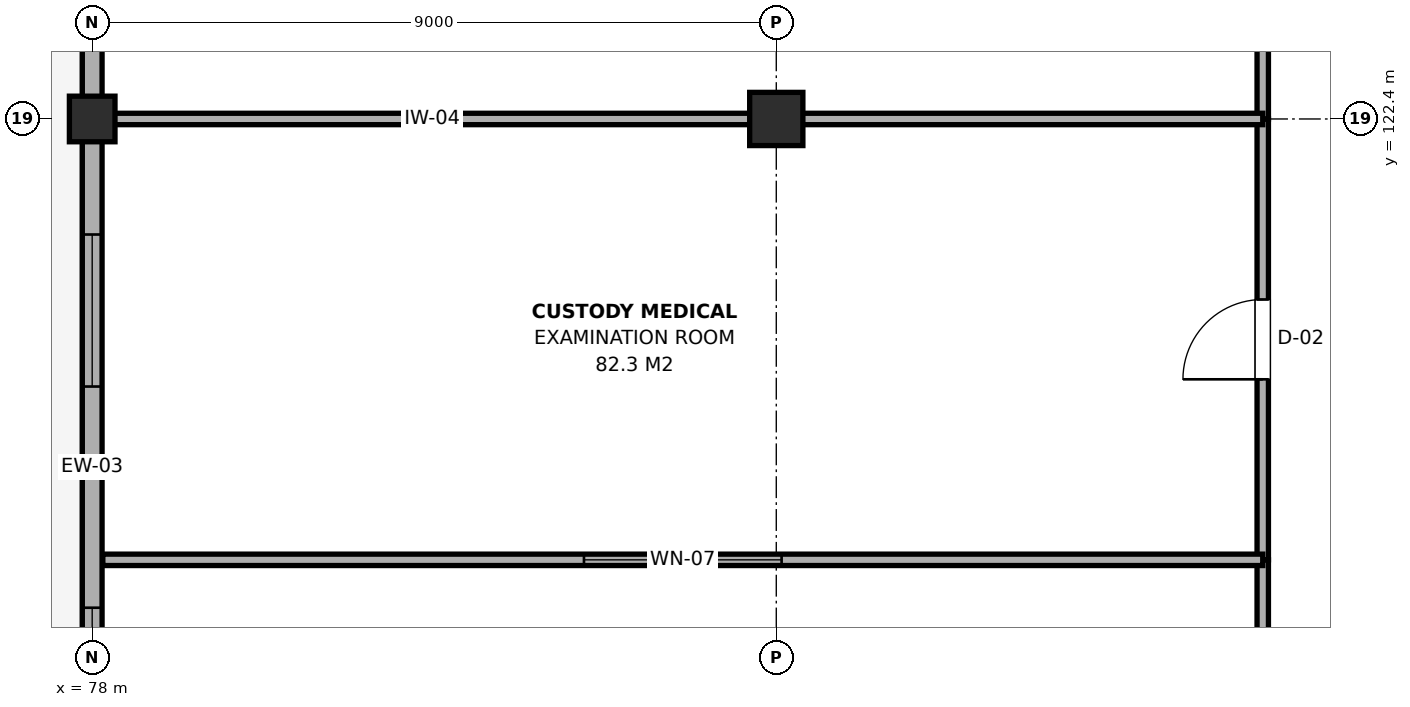
"""IFC4 building model, lengths in metres.
Left out: names, types, materials, properties, quantities, classifications, styles, units other than length and angle.
Written with IfcOpenShell. Run it as: python <this file> out.ifc"""

import sys

from ifc_helpers import new_model, si_unit, direction, frame, frame_2d, origin, origin_2d, place, context, subcontext, project, spatial, rectangle, extrude, element, fill, save


model = new_model("IFC4")
c1 = context("Model", 3, precision=1e-05, world=origin(), true_north=direction((0.0, 1.0)))
c2 = subcontext(c1, "Body", "Model", "MODEL_VIEW")
j1 = project(units=[si_unit("LENGTHUNIT", "METRE"), si_unit("PLANEANGLEUNIT", "RADIAN")], contexts=[c1])
p1 = place(None, origin())
s1 = spatial("IfcSite", under=j1, at=p1, CompositionType="ELEMENT")
p2 = place(p1, origin())
s2 = spatial("IfcBuilding", under=s1, at=p2, CompositionType="ELEMENT")
p3 = place(p2, frame((0.0, 0.0, 4.8)))
s3 = spatial("IfcBuildingStorey", under=s2, at=p3, CompositionType="ELEMENT", Elevation=4.8)
p4 = place(p3, frame((78.0, 122.4, 0.0), z_axis=(0.0, 0.0, 1.0), x_axis=(1.0, 0.0, 0.0)))
e1 = element("IfcColumn", 1, at=p4, inside=s3, PredefinedType="COLUMN", context=c2, shape_type="SweptSolid", body=[
    extrude(rectangle(XDim=0.6, YDim=0.6, at=origin_2d()), origin(), (0.0, 0.0, 1.0), 4.2),
])
p5 = place(p3, frame((87.0, 122.4, 0.0), z_axis=(0.0, 0.0, 1.0), x_axis=(1.0, 0.0, 0.0)))
e2 = element("IfcColumn", 2, at=p5, inside=s3, PredefinedType="COLUMN", context=c2, shape_type="SweptSolid", body=[
    extrude(rectangle(XDim=0.7, YDim=0.7, at=origin_2d()), origin(), (0.0, 0.0, 1.0), 4.2),
])
p6 = place(p3, frame((78.0, 113.4, 0.0), z_axis=(0.0, 0.0, 1.0), x_axis=(0.0, 1.0, 0.0)))
e3 = element("IfcWall", 3, at=p6, inside=s3, PredefinedType="SOLIDWALL", context=c2, shape_type="SweptSolid", body=[
    extrude(rectangle(XDim=9.0, YDim=0.26, at=frame_2d((4.5, 0.0))), origin(), (0.0, 0.0, 1.0), 3.485),
])
p7 = place(p6, frame((0.57, 0.0, 1.05)))
e4 = element("IfcOpeningElement", 4, at=p7, cuts=e3, PredefinedType="OPENING", context=c2, shape_type="SweptSolid", body=[
    extrude(rectangle(XDim=2.0, YDim=1.8, at=frame_2d((1.0, 0.9))), frame((0.0, 0.145, 0.0), z_axis=(0.0, -1.0, 0.0), x_axis=(1.0, 0.0, 0.0)), (0.0, 0.0, 1.0), 0.29),
])
p8 = place(p6, frame((5.48, 0.0, 1.05)))
e5 = element("IfcOpeningElement", 5, at=p8, cuts=e3, PredefinedType="OPENING", context=c2, shape_type="SweptSolid", body=[
    extrude(rectangle(XDim=2.0, YDim=1.8, at=frame_2d((1.0, 0.9))), frame((0.0, 0.145, 0.0), z_axis=(0.0, -1.0, 0.0), x_axis=(1.0, 0.0, 0.0)), (0.0, 0.0, 1.0), 0.29),
])
p9 = place(p3, frame((78.0, 122.4, 0.0), z_axis=(0.0, 0.0, 1.0), x_axis=(0.0, 1.0, 0.0)))
e6 = element("IfcWall", 6, at=p9, inside=s3, PredefinedType="SOLIDWALL", context=c2, shape_type="SweptSolid", body=[
    extrude(rectangle(XDim=8.4, YDim=0.26, at=frame_2d((4.2, 0.0))), origin(), (0.0, 0.0, 1.0), 3.535),
])
p10 = place(p9, frame((1.352, 0.0, 1.05)))
e7 = element("IfcOpeningElement", 7, at=p10, cuts=e6, PredefinedType="OPENING", context=c2, shape_type="SweptSolid", body=[
    extrude(rectangle(XDim=2.0, YDim=1.8, at=frame_2d((1.0, 0.9))), frame((0.0, 0.145, 0.0), z_axis=(0.0, -1.0, 0.0), x_axis=(1.0, 0.0, 0.0)), (0.0, 0.0, 1.0), 0.29),
])
p11 = place(p9, frame((5.048, 0.0, 1.05)))
e8 = element("IfcOpeningElement", 8, at=p11, cuts=e6, PredefinedType="OPENING", context=c2, shape_type="SweptSolid", body=[
    extrude(rectangle(XDim=2.0, YDim=1.8, at=frame_2d((1.0, 0.9))), frame((0.0, 0.145, 0.0), z_axis=(0.0, -1.0, 0.0), x_axis=(1.0, 0.0, 0.0)), (0.0, 0.0, 1.0), 0.29),
])
p12 = place(p3, frame((93.4, 110.6, 0.0), z_axis=(0.0, 0.0, 1.0), x_axis=(0.0, 1.0, 0.0)))
e9 = element("IfcWall", 9, at=p12, inside=s3, PredefinedType="PARTITIONING", context=c2, shape_type="SweptSolid", body=[
    extrude(rectangle(XDim=6.0, YDim=0.15, at=frame_2d((3.0, 0.0))), origin(), (0.0, 0.0, 1.0), 3.625),
])
p13 = place(p12, frame((2.525, 0.0, 0.0)))
e10 = element("IfcOpeningElement", 10, at=p13, cuts=e9, PredefinedType="OPENING", context=c2, shape_type="SweptSolid", body=[
    extrude(rectangle(XDim=0.95, YDim=2.15, at=frame_2d((0.475, 1.075))), frame((0.0, 0.09, 0.0), z_axis=(0.0, -1.0, 0.0), x_axis=(1.0, 0.0, 0.0)), (0.0, 0.0, 1.0), 0.18),
])
p14 = place(p3, frame((93.4, 116.6, 0.0), z_axis=(0.0, 0.0, 1.0), x_axis=(0.0, 1.0, 0.0)))
e11 = element("IfcWall", 11, at=p14, inside=s3, PredefinedType="PARTITIONING", context=c2, shape_type="SweptSolid", body=[
    extrude(rectangle(XDim=5.8, YDim=0.15, at=frame_2d((2.9, 0.0))), origin(), (0.0, 0.0, 1.0), 3.385),
])
p15 = place(p14, frame((2.375, 0.0, 0.0)))
e12 = element("IfcOpeningElement", 12, at=p15, cuts=e11, PredefinedType="OPENING", context=c2, shape_type="SweptSolid", body=[
    extrude(rectangle(XDim=1.05, YDim=2.15, at=frame_2d((0.525, 1.075))), frame((0.0, 0.09, 0.0), z_axis=(0.0, -1.0, 0.0), x_axis=(1.0, 0.0, 0.0)), (0.0, 0.0, 1.0), 0.18),
])
p16 = place(p3, frame((78.14, 116.6, 0.0), z_axis=(0.0, 0.0, 1.0), x_axis=(1.0, 0.0, 0.0)))
e13 = element("IfcWall", 13, at=p16, inside=s3, PredefinedType="PARTITIONING", context=c2, shape_type="SweptSolid", body=[
    extrude(rectangle(XDim=15.26, YDim=0.15, at=frame_2d((7.63, 0.0))), origin(), (0.0, 0.0, 1.0), 3.385),
])
p17 = place(p16, frame((6.33, 0.0, 0.95)))
e14 = element("IfcOpeningElement", 14, at=p17, cuts=e13, PredefinedType="OPENING", context=c2, shape_type="SweptSolid", body=[
    extrude(rectangle(XDim=2.6, YDim=1.5, at=frame_2d((1.3, 0.75))), frame((0.0, 0.09, 0.0), z_axis=(0.0, -1.0, 0.0), x_axis=(1.0, 0.0, 0.0)), (0.0, 0.0, 1.0), 0.18),
])
p18 = place(p3, frame((93.4, 122.4, 0.0), z_axis=(0.0, 0.0, 1.0), x_axis=(0.0, 1.0, 0.0)))
e15 = element("IfcWall", 15, at=p18, inside=s3, PredefinedType="PARTITIONING", context=c2, shape_type="SweptSolid", body=[
    extrude(rectangle(XDim=22.8, YDim=0.15, at=frame_2d((11.4, 0.0))), origin(), (0.0, 0.0, 1.0), 3.385),
])
p19 = place(p18, frame((10.65, 0.0, 0.0)))
e16 = element("IfcOpeningElement", 16, at=p19, cuts=e15, PredefinedType="OPENING", context=c2, shape_type="SweptSolid", body=[
    extrude(rectangle(XDim=1.5, YDim=2.15, at=frame_2d((0.75, 1.075))), frame((0.0, 0.09, 0.0), z_axis=(0.0, -1.0, 0.0), x_axis=(1.0, 0.0, 0.0)), (0.0, 0.0, 1.0), 0.18),
])
p20 = place(p18, frame((4.4, 0.0, 0.95)))
e17 = element("IfcOpeningElement", 17, at=p20, cuts=e15, PredefinedType="OPENING", context=c2, shape_type="SweptSolid", body=[
    extrude(rectangle(XDim=2.6, YDim=1.5, at=frame_2d((1.3, 0.75))), frame((0.0, 0.09, 0.0), z_axis=(0.0, -1.0, 0.0), x_axis=(1.0, 0.0, 0.0)), (0.0, 0.0, 1.0), 0.18),
])
p21 = place(p18, frame((15.8, 0.0, 0.95)))
e18 = element("IfcOpeningElement", 18, at=p21, cuts=e15, PredefinedType="OPENING", context=c2, shape_type="SweptSolid", body=[
    extrude(rectangle(XDim=2.6, YDim=1.5, at=frame_2d((1.3, 0.75))), frame((0.0, 0.09, 0.0), z_axis=(0.0, -1.0, 0.0), x_axis=(1.0, 0.0, 0.0)), (0.0, 0.0, 1.0), 0.18),
])
p22 = place(p3, frame((78.14, 122.4, 0.0), z_axis=(0.0, 0.0, 1.0), x_axis=(1.0, 0.0, 0.0)))
e19 = element("IfcWall", 19, at=p22, inside=s3, PredefinedType="PARTITIONING", context=c2, shape_type="SweptSolid", body=[
    extrude(rectangle(XDim=15.26, YDim=0.15, at=frame_2d((7.63, 0.0))), origin(), (0.0, 0.0, 1.0), 3.385),
])
p23 = place(p7, origin())
e20 = element("IfcWindow", 20, at=p23, inside=s3, PartitioningType="SINGLE_PANEL", PredefinedType="WINDOW", context=c2, shape_type="SweptSolid", body=[
    extrude(rectangle(XDim=2.0, YDim=1.8, at=frame_2d((1.0, 0.9))), frame((0.0, 0.03, 0.0), z_axis=(0.0, -1.0, 0.0), x_axis=(1.0, 0.0, 0.0)), (0.0, 0.0, 1.0), 0.06),
])
fill(e4, e20)
p24 = place(p8, origin())
e21 = element("IfcWindow", 21, at=p24, inside=s3, PartitioningType="SINGLE_PANEL", PredefinedType="WINDOW", context=c2, shape_type="SweptSolid", body=[
    extrude(rectangle(XDim=2.0, YDim=1.8, at=frame_2d((1.0, 0.9))), frame((0.0, 0.03, 0.0), z_axis=(0.0, -1.0, 0.0), x_axis=(1.0, 0.0, 0.0)), (0.0, 0.0, 1.0), 0.06),
])
fill(e5, e21)
p25 = place(p15, origin())
e22 = element("IfcDoor", 22, at=p25, inside=s3, OperationType="SINGLE_SWING_LEFT", PredefinedType="DOOR", context=c2, shape_type="SweptSolid", body=[
    extrude(rectangle(XDim=1.05, YDim=2.15, at=frame_2d((0.525, 1.075))), frame((0.0, 0.025, 0.0), z_axis=(0.0, -1.0, 0.0), x_axis=(1.0, 0.0, 0.0)), (0.0, 0.0, 1.0), 0.05),
])
fill(e12, e22)
p26 = place(p17, origin())
e23 = element("IfcWindow", 23, at=p26, inside=s3, PartitioningType="SINGLE_PANEL", PredefinedType="WINDOW", context=c2, shape_type="SweptSolid", body=[
    extrude(rectangle(XDim=2.6, YDim=1.5, at=frame_2d((1.3, 0.75))), frame((0.0, 0.03, 0.0), z_axis=(0.0, -1.0, 0.0), x_axis=(1.0, 0.0, 0.0)), (0.0, 0.0, 1.0), 0.06),
])
fill(e14, e23)
save(model, sys.argv[1])
